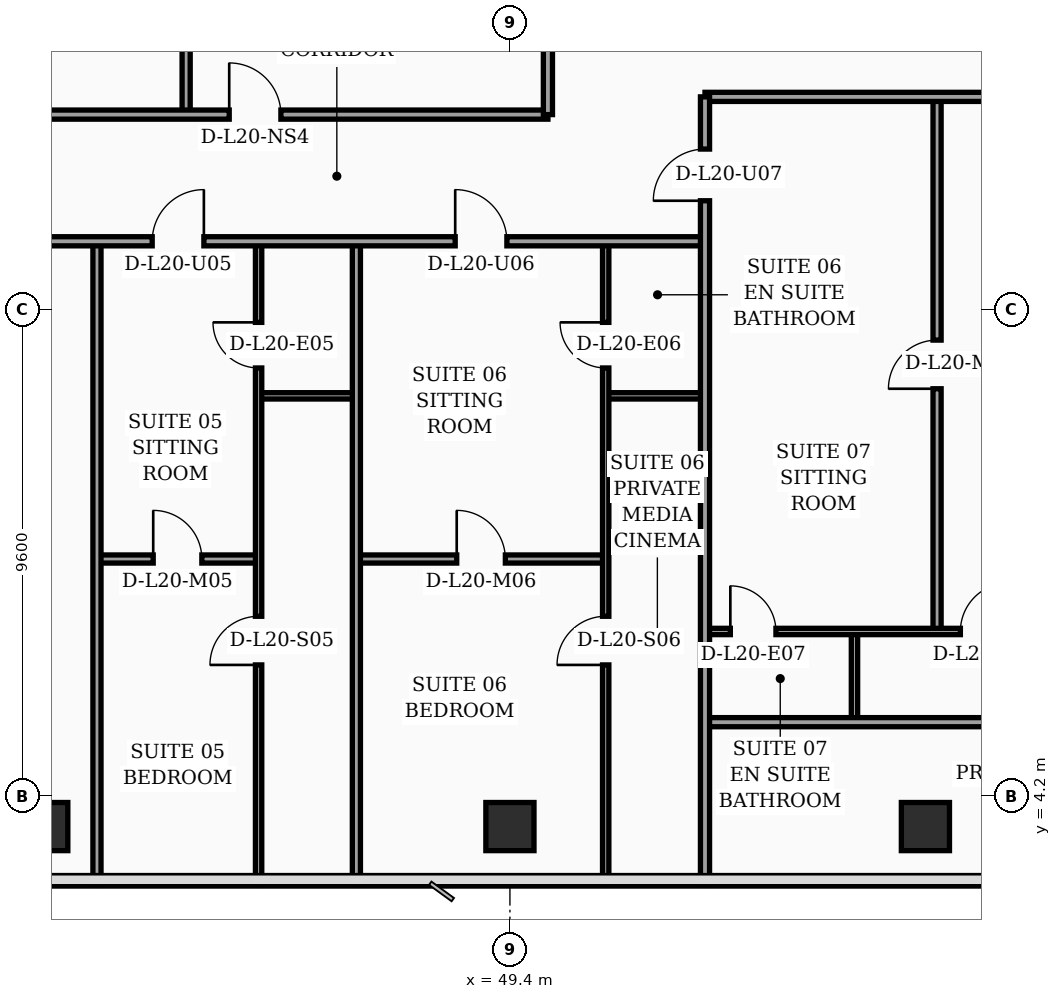
"""IFC4 building model, lengths in metres.
Left out: names, types, materials, properties, quantities, classifications, styles, units other than length and angle.
Written with IfcOpenShell. Run it as: python <this file> out.ifc"""

import sys

from ifc_helpers import new_model, si_unit, direction, frame, frame_2d, origin, origin_2d, place, context, subcontext, project, spatial, rectangle, hollow_rectangle, extrude, element, fill, save


model = new_model("IFC4")
c1 = context("Model", 3, precision=1e-05, world=origin(), true_north=direction((0.0, 1.0)))
c2 = subcontext(c1, "Body", "Model", "MODEL_VIEW")
j1 = project(units=[si_unit("LENGTHUNIT", "METRE"), si_unit("PLANEANGLEUNIT", "RADIAN")], contexts=[c1])
p1 = place(None, origin())
s1 = spatial("IfcSite", under=j1, at=p1, CompositionType="ELEMENT")
p2 = place(p1, origin())
s2 = spatial("IfcBuilding", under=s1, at=p2, CompositionType="ELEMENT")
p3 = place(p2, frame((0.0, 0.0, 85.0)))
s3 = spatial("IfcBuildingStorey", under=s2, at=p3, CompositionType="ELEMENT", Elevation=85.0)
for number, where, z_axis, x_axis in (
    (1, (40.2, 3.6, 0.0), (0.0, 0.0, 1.0), (1.0, 0.0, 0.0)),
    (2, (49.4, 3.6, 0.0), (0.0, 0.0, 1.0), (1.0, 0.0, 0.0)),
    (3, (57.6, 3.6, 0.0), (0.0, 0.0, 1.0), (1.0, 0.0, 0.0)),
):
    element("IfcColumn", number, at=place(p3, frame(where, z_axis=z_axis, x_axis=x_axis)), inside=s3, PredefinedType="COLUMN", context=c2, shape_type="SweptSolid", body=[
        extrude(hollow_rectangle(XDim=0.95, YDim=0.95, WallThickness=0.04, at=origin_2d()), origin(), (0.0, 0.0, 1.0), 3.56),
    ])
p4 = place(p3, frame((63.63, 5.505, 0.0), z_axis=(0.0, 0.0, 1.0), x_axis=(-0.300501856448, 0.953781229775, 0.0)))
e4 = element("IfcWall", 4, at=p4, inside=s3, PredefinedType="SOLIDWALL", context=c2, shape_type="SweptSolid", body=[
    extrude(rectangle(XDim=30.814, YDim=0.32, at=frame_2d((15.407, 0.0))), origin(), (0.0, 0.0, 1.0), 3.56),
])
p5 = place(p4, frame((10.199, 0.0, 0.0)))
e5 = element("IfcOpeningElement", 5, at=p5, cuts=e4, PredefinedType="OPENING", context=c2, shape_type="SweptSolid", body=[
    extrude(rectangle(XDim=1.4, YDim=2.25, at=frame_2d((0.7, 1.125))), frame((0.0, 0.17, 0.0), z_axis=(0.0, -1.0, 0.0), x_axis=(1.0, 0.0, 0.0)), (0.0, 0.0, 1.0), 0.34),
])
p6 = place(p4, frame((2.65, 0.0, 0.75)))
e6 = element("IfcOpeningElement", 6, at=p6, cuts=e4, PredefinedType="OPENING", context=c2, shape_type="SweptSolid", body=[
    extrude(rectangle(XDim=1.5, YDim=1.6, at=frame_2d((0.75, 0.8))), frame((0.0, 0.17, 0.0), z_axis=(0.0, -1.0, 0.0), x_axis=(1.0, 0.0, 0.0)), (0.0, 0.0, 1.0), 0.34),
])
p7 = place(p4, frame((4.7, 0.0, 0.75)))
e7 = element("IfcOpeningElement", 7, at=p7, cuts=e4, PredefinedType="OPENING", context=c2, shape_type="SweptSolid", body=[
    extrude(rectangle(XDim=1.5, YDim=1.6, at=frame_2d((0.75, 0.8))), frame((0.0, 0.17, 0.0), z_axis=(0.0, -1.0, 0.0), x_axis=(1.0, 0.0, 0.0)), (0.0, 0.0, 1.0), 0.34),
])
p8 = place(p4, frame((7.8, 0.0, 0.75)))
e8 = element("IfcOpeningElement", 8, at=p8, cuts=e4, PredefinedType="OPENING", context=c2, shape_type="SweptSolid", body=[
    extrude(rectangle(XDim=1.5, YDim=1.6, at=frame_2d((0.75, 0.8))), frame((0.0, 0.17, 0.0), z_axis=(0.0, -1.0, 0.0), x_axis=(1.0, 0.0, 0.0)), (0.0, 0.0, 1.0), 0.34),
])
p9 = place(p4, frame((14.0, 0.0, 0.75)))
e9 = element("IfcOpeningElement", 9, at=p9, cuts=e4, PredefinedType="OPENING", context=c2, shape_type="SweptSolid", body=[
    extrude(rectangle(XDim=1.5, YDim=1.6, at=frame_2d((0.75, 0.8))), frame((0.0, 0.17, 0.0), z_axis=(0.0, -1.0, 0.0), x_axis=(1.0, 0.0, 0.0)), (0.0, 0.0, 1.0), 0.34),
])
p10 = place(p4, frame((17.1, 0.0, 0.75)))
e10 = element("IfcOpeningElement", 10, at=p10, cuts=e4, PredefinedType="OPENING", context=c2, shape_type="SweptSolid", body=[
    extrude(rectangle(XDim=1.5, YDim=1.6, at=frame_2d((0.75, 0.8))), frame((0.0, 0.17, 0.0), z_axis=(0.0, -1.0, 0.0), x_axis=(1.0, 0.0, 0.0)), (0.0, 0.0, 1.0), 0.34),
])
p11 = place(p4, frame((20.2, 0.0, 0.75)))
e11 = element("IfcOpeningElement", 11, at=p11, cuts=e4, PredefinedType="OPENING", context=c2, shape_type="SweptSolid", body=[
    extrude(rectangle(XDim=1.5, YDim=1.6, at=frame_2d((0.75, 0.8))), frame((0.0, 0.17, 0.0), z_axis=(0.0, -1.0, 0.0), x_axis=(1.0, 0.0, 0.0)), (0.0, 0.0, 1.0), 0.34),
])
p12 = place(p4, frame((23.3, 0.0, 0.75)))
e12 = element("IfcOpeningElement", 12, at=p12, cuts=e4, PredefinedType="OPENING", context=c2, shape_type="SweptSolid", body=[
    extrude(rectangle(XDim=1.5, YDim=1.6, at=frame_2d((0.75, 0.8))), frame((0.0, 0.17, 0.0), z_axis=(0.0, -1.0, 0.0), x_axis=(1.0, 0.0, 0.0)), (0.0, 0.0, 1.0), 0.34),
])
p13 = place(p4, frame((26.4, 0.0, 0.75)))
e13 = element("IfcOpeningElement", 13, at=p13, cuts=e4, PredefinedType="OPENING", context=c2, shape_type="SweptSolid", body=[
    extrude(rectangle(XDim=1.5, YDim=1.6, at=frame_2d((0.75, 0.8))), frame((0.0, 0.17, 0.0), z_axis=(0.0, -1.0, 0.0), x_axis=(1.0, 0.0, 0.0)), (0.0, 0.0, 1.0), 0.34),
])
p14 = place(p3, frame((44.44, 12.1, 0.0), z_axis=(0.0, 0.0, 1.0), x_axis=(1.0, 0.0, 0.0)))
e14 = element("IfcWall", 14, at=p14, inside=s3, PredefinedType="PARTITIONING", context=c2, shape_type="SweptSolid", body=[
    extrude(rectangle(XDim=1.93, YDim=0.125, at=frame_2d((0.965, 0.0))), origin(), (0.0, 0.0, 1.0), 3.56),
])
p15 = place(p3, frame((41.25, 8.88, 0.0), z_axis=(0.0, 0.0, 1.0), x_axis=(1.0, 0.0, 0.0)))
e15 = element("IfcWall", 15, at=p15, inside=s3, PredefinedType="PARTITIONING", context=c2, shape_type="SweptSolid", body=[
    extrude(rectangle(XDim=3.19, YDim=0.16, at=frame_2d((1.595, 0.0))), origin(), (0.0, 0.0, 1.0), 3.56),
])
p16 = place(p15, frame((1.11, 0.0, 0.0)))
e16 = element("IfcOpeningElement", 16, at=p16, cuts=e15, PredefinedType="OPENING", context=c2, shape_type="SweptSolid", body=[
    extrude(rectangle(XDim=0.96, YDim=2.2, at=frame_2d((0.48, 1.1))), frame((0.0, 0.09, 0.0), z_axis=(0.0, -1.0, 0.0), x_axis=(1.0, 0.0, 0.0)), (0.0, 0.0, 1.0), 0.18),
])
p17 = place(p3, frame((44.44, 2.44, 0.0), z_axis=(0.0, 0.0, 1.0), x_axis=(0.0, 1.0, 0.0)))
e17 = element("IfcWall", 17, at=p17, inside=s3, PredefinedType="PARTITIONING", context=c2, shape_type="SweptSolid", body=[
    extrude(rectangle(XDim=12.71, YDim=0.125, at=frame_2d((6.355, 0.0))), origin(), (0.0, 0.0, 1.0), 3.04),
])
p18 = place(p17, frame((4.35, 0.0, 0.0)))
e18 = element("IfcOpeningElement", 18, at=p18, cuts=e17, PredefinedType="OPENING", context=c2, shape_type="SweptSolid", body=[
    extrude(rectangle(XDim=0.96, YDim=2.2, at=frame_2d((0.48, 1.1))), frame((0.0, 0.073, 0.0), z_axis=(0.0, -1.0, 0.0), x_axis=(1.0, 0.0, 0.0)), (0.0, 0.0, 1.0), 0.145),
])
p19 = place(p17, frame((10.21, 0.0, 0.0)))
e19 = element("IfcOpeningElement", 19, at=p19, cuts=e17, PredefinedType="OPENING", context=c2, shape_type="SweptSolid", body=[
    extrude(rectangle(XDim=0.9, YDim=2.15, at=frame_2d((0.45, 1.075))), frame((0.0, 0.073, 0.0), z_axis=(0.0, -1.0, 0.0), x_axis=(1.0, 0.0, 0.0)), (0.0, 0.0, 1.0), 0.145),
])
p20 = place(p3, frame((41.25, 2.44, 0.0), z_axis=(0.0, 0.0, 1.0), x_axis=(0.0, 1.0, 0.0)))
e20 = element("IfcWall", 20, at=p20, inside=s3, PredefinedType="PARTITIONING", context=c2, shape_type="SweptSolid", body=[
    extrude(rectangle(XDim=12.71, YDim=0.16, at=frame_2d((6.355, 0.0))), origin(), (0.0, 0.0, 1.0), 3.04),
])
p21 = place(p3, frame((51.29, 12.1, 0.0), z_axis=(0.0, 0.0, 1.0), x_axis=(1.0, 0.0, 0.0)))
e21 = element("IfcWall", 21, at=p21, inside=s3, PredefinedType="PARTITIONING", context=c2, shape_type="SweptSolid", body=[
    extrude(rectangle(XDim=1.96, YDim=0.125, at=frame_2d((0.98, 0.0))), origin(), (0.0, 0.0, 1.0), 3.56),
])
p22 = place(p3, frame((46.37, 8.88, 0.0), z_axis=(0.0, 0.0, 1.0), x_axis=(1.0, 0.0, 0.0)))
e22 = element("IfcWall", 22, at=p22, inside=s3, PredefinedType="PARTITIONING", context=c2, shape_type="SweptSolid", body=[
    extrude(rectangle(XDim=4.92, YDim=0.16, at=frame_2d((2.46, 0.0))), origin(), (0.0, 0.0, 1.0), 2.84),
])
p23 = place(p22, frame((1.98, 0.0, 0.0)))
e23 = element("IfcOpeningElement", 23, at=p23, cuts=e22, PredefinedType="OPENING", context=c2, shape_type="SweptSolid", body=[
    extrude(rectangle(XDim=0.96, YDim=2.2, at=frame_2d((0.48, 1.1))), frame((0.0, 0.09, 0.0), z_axis=(0.0, -1.0, 0.0), x_axis=(1.0, 0.0, 0.0)), (0.0, 0.0, 1.0), 0.18),
])
p24 = place(p3, frame((51.29, 2.44, 0.0), z_axis=(0.0, 0.0, 1.0), x_axis=(0.0, 1.0, 0.0)))
e24 = element("IfcWall", 24, at=p24, inside=s3, PredefinedType="PARTITIONING", context=c2, shape_type="SweptSolid", body=[
    extrude(rectangle(XDim=12.71, YDim=0.125, at=frame_2d((6.355, 0.0))), origin(), (0.0, 0.0, 1.0), 3.04),
])
p25 = place(p24, frame((4.35, 0.0, 0.0)))
e25 = element("IfcOpeningElement", 25, at=p25, cuts=e24, PredefinedType="OPENING", context=c2, shape_type="SweptSolid", body=[
    extrude(rectangle(XDim=0.96, YDim=2.2, at=frame_2d((0.48, 1.1))), frame((0.0, 0.073, 0.0), z_axis=(0.0, -1.0, 0.0), x_axis=(1.0, 0.0, 0.0)), (0.0, 0.0, 1.0), 0.145),
])
p26 = place(p24, frame((10.21, 0.0, 0.0)))
e26 = element("IfcOpeningElement", 26, at=p26, cuts=e24, PredefinedType="OPENING", context=c2, shape_type="SweptSolid", body=[
    extrude(rectangle(XDim=0.9, YDim=2.15, at=frame_2d((0.45, 1.075))), frame((0.0, 0.073, 0.0), z_axis=(0.0, -1.0, 0.0), x_axis=(1.0, 0.0, 0.0)), (0.0, 0.0, 1.0), 0.145),
])
p27 = place(p3, frame((46.37, 2.44, 0.0), z_axis=(0.0, 0.0, 1.0), x_axis=(0.0, 1.0, 0.0)))
e27 = element("IfcWall", 27, at=p27, inside=s3, PredefinedType="PARTITIONING", context=c2, shape_type="SweptSolid", body=[
    extrude(rectangle(XDim=12.71, YDim=0.16, at=frame_2d((6.355, 0.0))), origin(), (0.0, 0.0, 1.0), 3.04),
])
p28 = place(p3, frame((32.4, 15.15, 0.0), z_axis=(0.0, 0.0, 1.0), x_axis=(1.0, 0.0, 0.0)))
e28 = element("IfcWall", 28, at=p28, inside=s3, PredefinedType="PARTITIONING", context=c2, shape_type="SweptSolid", body=[
    extrude(rectangle(XDim=20.85, YDim=0.18, at=frame_2d((10.425, 0.0))), origin(), (0.0, 0.0, 1.0), 2.84),
])
p29 = place(p28, frame((1.1, 0.0, 0.0)))
e29 = element("IfcOpeningElement", 29, at=p29, cuts=e28, PredefinedType="OPENING", context=c2, shape_type="SweptSolid", body=[
    extrude(rectangle(XDim=1.5, YDim=2.22, at=frame_2d((0.75, 1.11))), frame((0.0, 0.1, 0.0), z_axis=(0.0, -1.0, 0.0), x_axis=(1.0, 0.0, 0.0)), (0.0, 0.0, 1.0), 0.2),
])
p30 = place(p28, frame((9.94, 0.0, 0.0)))
e30 = element("IfcOpeningElement", 30, at=p30, cuts=e28, PredefinedType="OPENING", context=c2, shape_type="SweptSolid", body=[
    extrude(rectangle(XDim=1.02, YDim=2.2, at=frame_2d((0.51, 1.1))), frame((0.0, 0.1, 0.0), z_axis=(0.0, -1.0, 0.0), x_axis=(1.0, 0.0, 0.0)), (0.0, 0.0, 1.0), 0.2),
])
p31 = place(p28, frame((15.92, 0.0, 0.0)))
e31 = element("IfcOpeningElement", 31, at=p31, cuts=e28, PredefinedType="OPENING", context=c2, shape_type="SweptSolid", body=[
    extrude(rectangle(XDim=1.02, YDim=2.2, at=frame_2d((0.51, 1.1))), frame((0.0, 0.1, 0.0), z_axis=(0.0, -1.0, 0.0), x_axis=(1.0, 0.0, 0.0)), (0.0, 0.0, 1.0), 0.2),
])
p32 = place(p3, frame((43.01, 17.65, 0.0), z_axis=(0.0, 0.0, 1.0), x_axis=(0.0, 1.0, 0.0)))
e32 = element("IfcWall", 32, at=p32, inside=s3, PredefinedType="PARTITIONING", context=c2, shape_type="SweptSolid", body=[
    extrude(rectangle(XDim=16.94, YDim=0.16, at=frame_2d((8.47, 0.0))), origin(), (0.0, 0.0, 1.0), 2.84),
])
p33 = place(p3, frame((21.5, 17.65, 0.0), z_axis=(0.0, 0.0, 1.0), x_axis=(1.0, 0.0, 0.0)))
e33 = element("IfcWall", 33, at=p33, inside=s3, PredefinedType="PARTITIONING", context=c2, shape_type="SweptSolid", body=[
    extrude(rectangle(XDim=28.65, YDim=0.18, at=frame_2d((14.325, 0.0))), origin(), (0.0, 0.0, 1.0), 2.84),
])
p34 = place(p33, frame((0.95, 0.0, 0.0)))
e34 = element("IfcOpeningElement", 34, at=p34, cuts=e33, PredefinedType="OPENING", context=c2, shape_type="SweptSolid", body=[
    extrude(rectangle(XDim=1.02, YDim=2.2, at=frame_2d((0.51, 1.1))), frame((0.0, 0.1, 0.0), z_axis=(0.0, -1.0, 0.0), x_axis=(1.0, 0.0, 0.0)), (0.0, 0.0, 1.0), 0.2),
])
p35 = place(p33, frame((8.74, 0.0, 0.0)))
e35 = element("IfcOpeningElement", 35, at=p35, cuts=e33, PredefinedType="OPENING", context=c2, shape_type="SweptSolid", body=[
    extrude(rectangle(XDim=1.02, YDim=2.2, at=frame_2d((0.51, 1.1))), frame((0.0, 0.1, 0.0), z_axis=(0.0, -1.0, 0.0), x_axis=(1.0, 0.0, 0.0)), (0.0, 0.0, 1.0), 0.2),
])
p36 = place(p33, frame((15.23, 0.0, 0.0)))
e36 = element("IfcOpeningElement", 36, at=p36, cuts=e33, PredefinedType="OPENING", context=c2, shape_type="SweptSolid", body=[
    extrude(rectangle(XDim=1.02, YDim=2.2, at=frame_2d((0.51, 1.1))), frame((0.0, 0.1, 0.0), z_axis=(0.0, -1.0, 0.0), x_axis=(1.0, 0.0, 0.0)), (0.0, 0.0, 1.0), 0.2),
])
p37 = place(p33, frame((22.36, 0.0, 0.0)))
e37 = element("IfcOpeningElement", 37, at=p37, cuts=e33, PredefinedType="OPENING", context=c2, shape_type="SweptSolid", body=[
    extrude(rectangle(XDim=1.02, YDim=2.2, at=frame_2d((0.51, 1.1))), frame((0.0, 0.1, 0.0), z_axis=(0.0, -1.0, 0.0), x_axis=(1.0, 0.0, 0.0)), (0.0, 0.0, 1.0), 0.2),
])
p38 = place(p3, frame((50.15, 17.65, 0.0), z_axis=(0.0, 0.0, 1.0), x_axis=(0.0, 1.0, 0.0)))
e38 = element("IfcWall", 38, at=p38, inside=s3, PredefinedType="PARTITIONING", context=c2, shape_type="SweptSolid", body=[
    extrude(rectangle(XDim=20.31, YDim=0.18, at=frame_2d((10.155, 0.0))), origin(), (0.0, 0.0, 1.0), 2.84),
])
p39 = place(p3, frame((56.2, 5.66, 0.0), z_axis=(0.0, 0.0, 1.0), x_axis=(0.0, 1.0, 0.0)))
e39 = element("IfcWall", 39, at=p39, inside=s3, PredefinedType="PARTITIONING", context=c2, shape_type="SweptSolid", body=[
    extrude(rectangle(XDim=1.79, YDim=0.125, at=frame_2d((0.895, 0.0))), origin(), (0.0, 0.0, 1.0), 3.56),
])
p40 = place(p3, frame((57.83, 7.45, 0.0), z_axis=(0.0, 0.0, 1.0), x_axis=(0.0, 1.0, 0.0)))
e40 = element("IfcWall", 40, at=p40, inside=s3, PredefinedType="PARTITIONING", context=c2, shape_type="SweptSolid", body=[
    extrude(rectangle(XDim=10.55, YDim=0.16, at=frame_2d((5.275, 0.0))), origin(), (0.0, 0.0, 1.0), 3.04),
])
p41 = place(p40, frame((4.79, 0.0, 0.0)))
e41 = element("IfcOpeningElement", 41, at=p41, cuts=e40, PredefinedType="OPENING", context=c2, shape_type="SweptSolid", body=[
    extrude(rectangle(XDim=0.96, YDim=2.2, at=frame_2d((0.48, 1.1))), frame((0.0, 0.09, 0.0), z_axis=(0.0, -1.0, 0.0), x_axis=(1.0, 0.0, 0.0)), (0.0, 0.0, 1.0), 0.18),
])
p42 = place(p3, frame((53.25, 7.45, 0.0), z_axis=(0.0, 0.0, 1.0), x_axis=(1.0, 0.0, 0.0)))
e42 = element("IfcWall", 42, at=p42, inside=s3, PredefinedType="PARTITIONING", context=c2, shape_type="SweptSolid", body=[
    extrude(rectangle(XDim=9.71, YDim=0.125, at=frame_2d((4.855, 0.0))), origin(), (0.0, 0.0, 1.0), 3.04),
])
p43 = place(p42, frame((0.5, 0.0, 0.0)))
e43 = element("IfcOpeningElement", 43, at=p43, cuts=e42, PredefinedType="OPENING", context=c2, shape_type="SweptSolid", body=[
    extrude(rectangle(XDim=0.9, YDim=2.15, at=frame_2d((0.45, 1.075))), frame((0.0, 0.073, 0.0), z_axis=(0.0, -1.0, 0.0), x_axis=(1.0, 0.0, 0.0)), (0.0, 0.0, 1.0), 0.145),
])
p44 = place(p42, frame((5.04, 0.0, 0.0)))
e44 = element("IfcOpeningElement", 44, at=p44, cuts=e42, PredefinedType="OPENING", context=c2, shape_type="SweptSolid", body=[
    extrude(rectangle(XDim=0.96, YDim=2.2, at=frame_2d((0.48, 1.1))), frame((0.0, 0.073, 0.0), z_axis=(0.0, -1.0, 0.0), x_axis=(1.0, 0.0, 0.0)), (0.0, 0.0, 1.0), 0.145),
])
p45 = place(p3, frame((53.25, 5.66, 0.0), z_axis=(0.0, 0.0, 1.0), x_axis=(1.0, 0.0, 0.0)))
e45 = element("IfcWall", 45, at=p45, inside=s3, PredefinedType="PARTITIONING", context=c2, shape_type="SweptSolid", body=[
    extrude(rectangle(XDim=7.15, YDim=0.18, at=frame_2d((3.575, 0.0))), origin(), (0.0, 0.0, 1.0), 3.04),
])
p46 = place(p3, frame((53.25, 18.0, 0.0), z_axis=(0.0, 0.0, 1.0), x_axis=(1.0, 0.0, 0.0)))
e46 = element("IfcWall", 46, at=p46, inside=s3, PredefinedType="PARTITIONING", context=c2, shape_type="SweptSolid", body=[
    extrude(rectangle(XDim=6.38, YDim=0.18, at=frame_2d((3.19, 0.0))), origin(), (0.0, 0.0, 1.0), 3.04),
])
p47 = place(p3, frame((53.25, 2.44, 0.0), z_axis=(0.0, 0.0, 1.0), x_axis=(0.0, 1.0, 0.0)))
e47 = element("IfcWall", 47, at=p47, inside=s3, PredefinedType="PARTITIONING", context=c2, shape_type="SweptSolid", body=[
    extrude(rectangle(XDim=15.56, YDim=0.18, at=frame_2d((7.78, 0.0))), origin(), (0.0, 0.0, 1.0), 3.04),
])
p48 = place(p47, frame((13.51, 0.0, 0.0)))
e48 = element("IfcOpeningElement", 48, at=p48, cuts=e47, PredefinedType="OPENING", context=c2, shape_type="SweptSolid", body=[
    extrude(rectangle(XDim=1.02, YDim=2.2, at=frame_2d((0.51, 1.1))), frame((0.0, 0.1, 0.0), z_axis=(0.0, -1.0, 0.0), x_axis=(1.0, 0.0, 0.0)), (0.0, 0.0, 1.0), 0.2),
])
p49 = place(p16, origin())
e49 = element("IfcDoor", 49, at=p49, inside=s3, OperationType="SINGLE_SWING_LEFT", PredefinedType="DOOR", context=c2, shape_type="SweptSolid", body=[
    extrude(rectangle(XDim=0.96, YDim=2.2, at=frame_2d((0.48, 1.1))), frame((0.0, 0.025, 0.0), z_axis=(0.0, -1.0, 0.0), x_axis=(1.0, 0.0, 0.0)), (0.0, 0.0, 1.0), 0.05),
])
fill(e16, e49)
p50 = place(p18, origin())
e50 = element("IfcDoor", 50, at=p50, inside=s3, OperationType="SINGLE_SWING_LEFT", PredefinedType="DOOR", context=c2, shape_type="SweptSolid", body=[
    extrude(rectangle(XDim=0.96, YDim=2.2, at=frame_2d((0.48, 1.1))), frame((0.0, 0.025, 0.0), z_axis=(0.0, -1.0, 0.0), x_axis=(1.0, 0.0, 0.0)), (0.0, 0.0, 1.0), 0.05),
])
fill(e18, e50)
p51 = place(p19, origin())
e51 = element("IfcDoor", 51, at=p51, inside=s3, OperationType="SINGLE_SWING_RIGHT", PredefinedType="DOOR", context=c2, shape_type="SweptSolid", body=[
    extrude(rectangle(XDim=0.9, YDim=2.15, at=frame_2d((0.45, 1.075))), frame((0.0, 0.025, 0.0), z_axis=(0.0, -1.0, 0.0), x_axis=(1.0, 0.0, 0.0)), (0.0, 0.0, 1.0), 0.05),
])
fill(e19, e51)
p52 = place(p23, origin())
e52 = element("IfcDoor", 52, at=p52, inside=s3, OperationType="SINGLE_SWING_LEFT", PredefinedType="DOOR", context=c2, shape_type="SweptSolid", body=[
    extrude(rectangle(XDim=0.96, YDim=2.2, at=frame_2d((0.48, 1.1))), frame((0.0, 0.025, 0.0), z_axis=(0.0, -1.0, 0.0), x_axis=(1.0, 0.0, 0.0)), (0.0, 0.0, 1.0), 0.05),
])
fill(e23, e52)
p53 = place(p25, origin())
e53 = element("IfcDoor", 53, at=p53, inside=s3, OperationType="SINGLE_SWING_LEFT", PredefinedType="DOOR", context=c2, shape_type="SweptSolid", body=[
    extrude(rectangle(XDim=0.96, YDim=2.2, at=frame_2d((0.48, 1.1))), frame((0.0, 0.025, 0.0), z_axis=(0.0, -1.0, 0.0), x_axis=(1.0, 0.0, 0.0)), (0.0, 0.0, 1.0), 0.05),
])
fill(e25, e53)
p54 = place(p26, origin())
e54 = element("IfcDoor", 54, at=p54, inside=s3, OperationType="SINGLE_SWING_RIGHT", PredefinedType="DOOR", context=c2, shape_type="SweptSolid", body=[
    extrude(rectangle(XDim=0.9, YDim=2.15, at=frame_2d((0.45, 1.075))), frame((0.0, 0.025, 0.0), z_axis=(0.0, -1.0, 0.0), x_axis=(1.0, 0.0, 0.0)), (0.0, 0.0, 1.0), 0.05),
])
fill(e26, e54)
p55 = place(p30, origin())
e55 = element("IfcDoor", 55, at=p55, inside=s3, OperationType="SINGLE_SWING_RIGHT", PredefinedType="DOOR", context=c2, shape_type="SweptSolid", body=[
    extrude(rectangle(XDim=1.02, YDim=2.2, at=frame_2d((0.51, 1.1))), frame((0.0, 0.025, 0.0), z_axis=(0.0, -1.0, 0.0), x_axis=(1.0, 0.0, 0.0)), (0.0, 0.0, 1.0), 0.05),
])
fill(e30, e55)
p56 = place(p31, origin())
e56 = element("IfcDoor", 56, at=p56, inside=s3, OperationType="SINGLE_SWING_LEFT", PredefinedType="DOOR", context=c2, shape_type="SweptSolid", body=[
    extrude(rectangle(XDim=1.02, YDim=2.2, at=frame_2d((0.51, 1.1))), frame((0.0, 0.025, 0.0), z_axis=(0.0, -1.0, 0.0), x_axis=(1.0, 0.0, 0.0)), (0.0, 0.0, 1.0), 0.05),
])
fill(e31, e56)
p57 = place(p37, origin())
e57 = element("IfcDoor", 57, at=p57, inside=s3, OperationType="SINGLE_SWING_LEFT", PredefinedType="DOOR", context=c2, shape_type="SweptSolid", body=[
    extrude(rectangle(XDim=1.02, YDim=2.2, at=frame_2d((0.51, 1.1))), frame((0.0, 0.025, 0.0), z_axis=(0.0, -1.0, 0.0), x_axis=(1.0, 0.0, 0.0)), (0.0, 0.0, 1.0), 0.05),
])
fill(e37, e57)
p58 = place(p41, origin())
e58 = element("IfcDoor", 58, at=p58, inside=s3, OperationType="SINGLE_SWING_LEFT", PredefinedType="DOOR", context=c2, shape_type="SweptSolid", body=[
    extrude(rectangle(XDim=0.96, YDim=2.2, at=frame_2d((0.48, 1.1))), frame((0.0, 0.025, 0.0), z_axis=(0.0, -1.0, 0.0), x_axis=(1.0, 0.0, 0.0)), (0.0, 0.0, 1.0), 0.05),
])
fill(e41, e58)
p59 = place(p43, origin())
e59 = element("IfcDoor", 59, at=p59, inside=s3, OperationType="SINGLE_SWING_LEFT", PredefinedType="DOOR", context=c2, shape_type="SweptSolid", body=[
    extrude(rectangle(XDim=0.9, YDim=2.15, at=frame_2d((0.45, 1.075))), frame((0.0, 0.025, 0.0), z_axis=(0.0, -1.0, 0.0), x_axis=(1.0, 0.0, 0.0)), (0.0, 0.0, 1.0), 0.05),
])
fill(e43, e59)
p60 = place(p44, origin())
e60 = element("IfcDoor", 60, at=p60, inside=s3, OperationType="SINGLE_SWING_RIGHT", PredefinedType="DOOR", context=c2, shape_type="SweptSolid", body=[
    extrude(rectangle(XDim=0.96, YDim=2.2, at=frame_2d((0.48, 1.1))), frame((0.0, 0.025, 0.0), z_axis=(0.0, -1.0, 0.0), x_axis=(1.0, 0.0, 0.0)), (0.0, 0.0, 1.0), 0.05),
])
fill(e44, e60)
p61 = place(p48, origin())
e61 = element("IfcDoor", 61, at=p61, inside=s3, OperationType="SINGLE_SWING_LEFT", PredefinedType="DOOR", context=c2, shape_type="SweptSolid", body=[
    extrude(rectangle(XDim=1.02, YDim=2.2, at=frame_2d((0.51, 1.1))), frame((0.0, 0.025, 0.0), z_axis=(0.0, -1.0, 0.0), x_axis=(1.0, 0.0, 0.0)), (0.0, 0.0, 1.0), 0.05),
])
fill(e48, e61)
save(model, sys.argv[1])
